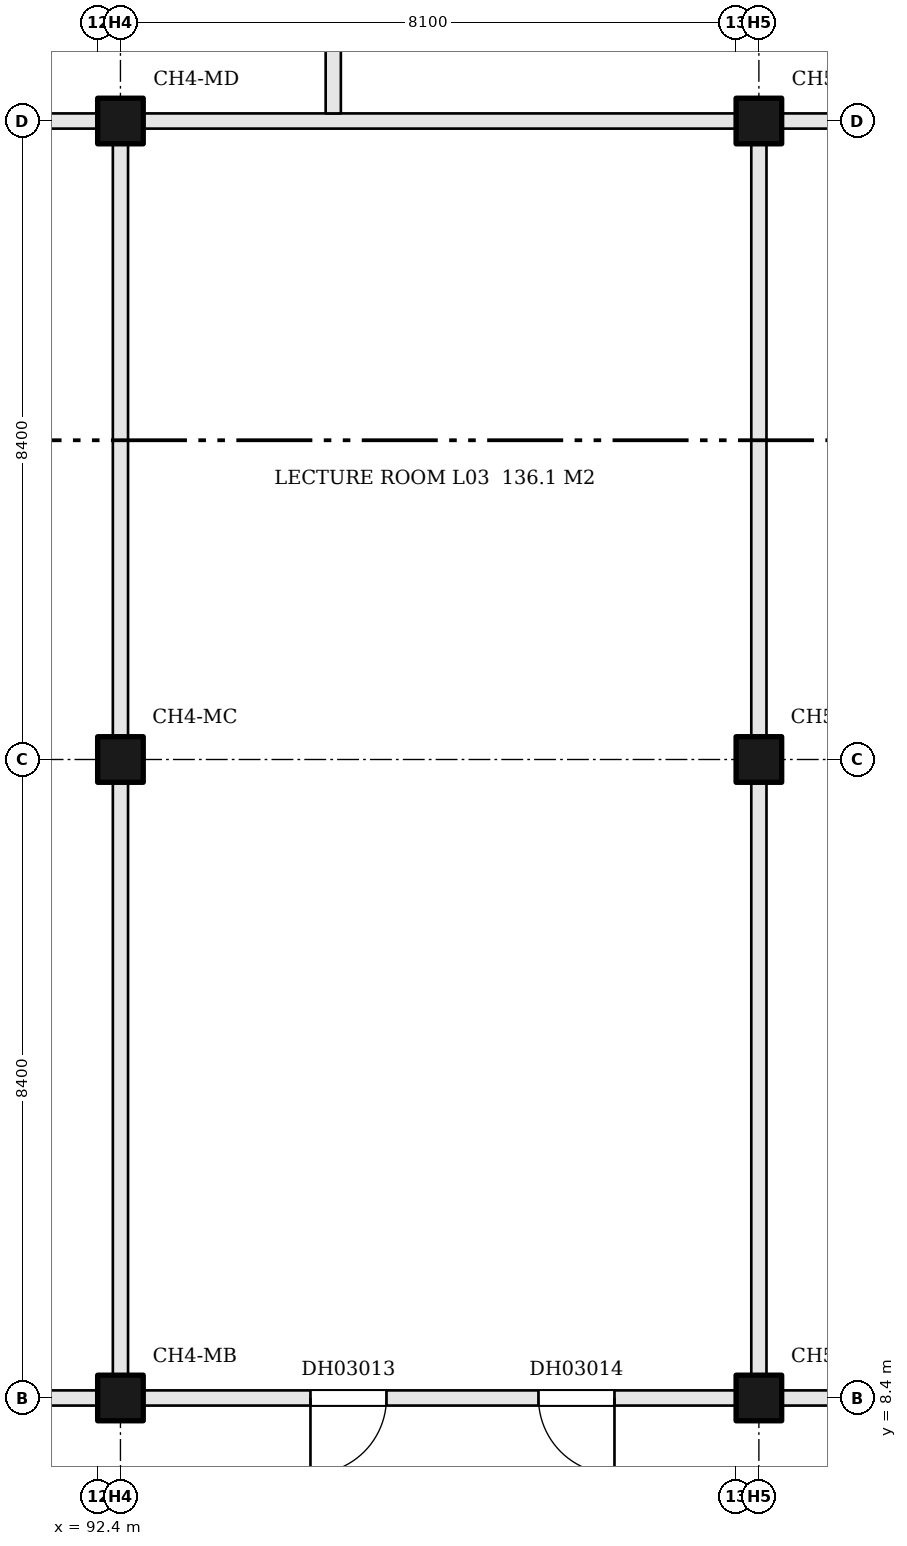
"""IFC4 building model, lengths in metres.
Left out: names, types, materials, properties, quantities, classifications, styles, units other than length and angle.
Written with IfcOpenShell. Run it as: python <this file> out.ifc"""

import sys

from ifc_helpers import new_model, si_unit, direction, frame, frame_2d, origin, origin_2d, place, context, subcontext, project, spatial, rectangle, extrude, element, fill, save


model = new_model("IFC4")
c1 = context("Model", 3, precision=1e-05, world=origin(), true_north=direction((0.0, 1.0)))
c2 = subcontext(c1, "Body", "Model", "MODEL_VIEW")
j1 = project(units=[si_unit("LENGTHUNIT", "METRE"), si_unit("PLANEANGLEUNIT", "RADIAN")], contexts=[c1])
p1 = place(None, origin())
s1 = spatial("IfcSite", under=j1, at=p1, CompositionType="ELEMENT")
p2 = place(p1, origin())
s2 = spatial("IfcBuilding", under=s1, at=p2, CompositionType="ELEMENT")
p3 = place(p2, frame((0.0, 0.0, 19.8)))
s3 = spatial("IfcBuildingStorey", under=s2, at=p3, CompositionType="ELEMENT", Elevation=19.8)
for number, where, z_axis, x_axis in (
    (1, (92.7, 8.4, 0.0), (0.0, 0.0, 1.0), (1.0, 0.0, 0.0)),
    (2, (92.7, 16.8, 0.0), (0.0, 0.0, 1.0), (1.0, 0.0, 0.0)),
    (3, (92.7, 25.2, 0.0), (0.0, 0.0, 1.0), (1.0, 0.0, 0.0)),
    (4, (101.1, 8.4, 0.0), (0.0, 0.0, 1.0), (1.0, 0.0, 0.0)),
    (5, (101.1, 16.8, 0.0), (0.0, 0.0, 1.0), (1.0, 0.0, 0.0)),
    (6, (101.1, 25.2, 0.0), (0.0, 0.0, 1.0), (1.0, 0.0, 0.0)),
):
    element("IfcColumn", number, at=place(p3, frame(where, z_axis=z_axis, x_axis=x_axis)), inside=s3, PredefinedType="COLUMN", context=c2, shape_type="SweptSolid", body=[
        extrude(rectangle(XDim=0.6, YDim=0.6, at=origin_2d()), origin(), (0.0, 0.0, 1.0), 5.0),
    ])
p4 = place(p3, frame((84.6, 8.4, 0.0), z_axis=(0.0, 0.0, 1.0), x_axis=(1.0, 0.0, 0.0)))
e7 = element("IfcWall", 7, at=p4, inside=s3, PredefinedType="PARTITIONING", context=c2, shape_type="SweptSolid", body=[
    extrude(rectangle(XDim=7.8, YDim=0.2, at=frame_2d((3.9, 0.0))), origin(), (0.0, 0.0, 1.0), 5.0),
])
p5 = place(p4, frame((2.2, 0.0, 0.0)))
e8 = element("IfcOpeningElement", 8, at=p5, cuts=e7, PredefinedType="OPENING", context=c2, shape_type="SweptSolid", body=[
    extrude(rectangle(XDim=1.0, YDim=2.1, at=frame_2d((0.5, 1.05))), frame((0.0, 0.11, 0.0), z_axis=(0.0, -1.0, 0.0), x_axis=(1.0, 0.0, 0.0)), (0.0, 0.0, 1.0), 0.22),
])
p6 = place(p4, frame((5.2, 0.0, 0.0)))
e9 = element("IfcOpeningElement", 9, at=p6, cuts=e7, PredefinedType="OPENING", context=c2, shape_type="SweptSolid", body=[
    extrude(rectangle(XDim=1.0, YDim=2.1, at=frame_2d((0.5, 1.05))), frame((0.0, 0.11, 0.0), z_axis=(0.0, -1.0, 0.0), x_axis=(1.0, 0.0, 0.0)), (0.0, 0.0, 1.0), 0.22),
])
p7 = place(p3, frame((93.0, 8.4, 0.0), z_axis=(0.0, 0.0, 1.0), x_axis=(1.0, 0.0, 0.0)))
e10 = element("IfcWall", 10, at=p7, inside=s3, PredefinedType="PARTITIONING", context=c2, shape_type="SweptSolid", body=[
    extrude(rectangle(XDim=7.8, YDim=0.2, at=frame_2d((3.9, 0.0))), origin(), (0.0, 0.0, 1.0), 5.0),
])
p8 = place(p7, frame((2.2, 0.0, 0.0)))
e11 = element("IfcOpeningElement", 11, at=p8, cuts=e10, PredefinedType="OPENING", context=c2, shape_type="SweptSolid", body=[
    extrude(rectangle(XDim=1.0, YDim=2.1, at=frame_2d((0.5, 1.05))), frame((0.0, 0.11, 0.0), z_axis=(0.0, -1.0, 0.0), x_axis=(1.0, 0.0, 0.0)), (0.0, 0.0, 1.0), 0.22),
])
p9 = place(p7, frame((5.2, 0.0, 0.0)))
e12 = element("IfcOpeningElement", 12, at=p9, cuts=e10, PredefinedType="OPENING", context=c2, shape_type="SweptSolid", body=[
    extrude(rectangle(XDim=1.0, YDim=2.1, at=frame_2d((0.5, 1.05))), frame((0.0, 0.11, 0.0), z_axis=(0.0, -1.0, 0.0), x_axis=(1.0, 0.0, 0.0)), (0.0, 0.0, 1.0), 0.22),
])
p10 = place(p3, frame((101.4, 8.4, 0.0), z_axis=(0.0, 0.0, 1.0), x_axis=(1.0, 0.0, 0.0)))
e13 = element("IfcWall", 13, at=p10, inside=s3, PredefinedType="PARTITIONING", context=c2, shape_type="SweptSolid", body=[
    extrude(rectangle(XDim=7.8, YDim=0.2, at=frame_2d((3.9, 0.0))), origin(), (0.0, 0.0, 1.0), 5.0),
])
p11 = place(p10, frame((2.2, 0.0, 0.0)))
e14 = element("IfcOpeningElement", 14, at=p11, cuts=e13, PredefinedType="OPENING", context=c2, shape_type="SweptSolid", body=[
    extrude(rectangle(XDim=1.0, YDim=2.1, at=frame_2d((0.5, 1.05))), frame((0.0, 0.11, 0.0), z_axis=(0.0, -1.0, 0.0), x_axis=(1.0, 0.0, 0.0)), (0.0, 0.0, 1.0), 0.22),
])
p12 = place(p10, frame((5.2, 0.0, 0.0)))
e15 = element("IfcOpeningElement", 15, at=p12, cuts=e13, PredefinedType="OPENING", context=c2, shape_type="SweptSolid", body=[
    extrude(rectangle(XDim=1.0, YDim=2.1, at=frame_2d((0.5, 1.05))), frame((0.0, 0.11, 0.0), z_axis=(0.0, -1.0, 0.0), x_axis=(1.0, 0.0, 0.0)), (0.0, 0.0, 1.0), 0.22),
])
p13 = place(p3, frame((84.6, 25.2, 0.0), z_axis=(0.0, 0.0, 1.0), x_axis=(1.0, 0.0, 0.0)))
e16 = element("IfcWall", 16, at=p13, inside=s3, PredefinedType="PARTITIONING", context=c2, shape_type="SweptSolid", body=[
    extrude(rectangle(XDim=7.8, YDim=0.2, at=frame_2d((3.9, 0.0))), origin(), (0.0, 0.0, 1.0), 5.0),
])
for number, where, z_axis, x_axis in (
    (17, (93.0, 25.2, 0.0), (0.0, 0.0, 1.0), (1.0, 0.0, 0.0)),
    (18, (101.4, 25.2, 0.0), (0.0, 0.0, 1.0), (1.0, 0.0, 0.0)),
    (19, (92.7, 8.7, 0.0), (0.0, 0.0, 1.0), (0.0, 1.0, 0.0)),
):
    element("IfcWall", number, at=place(p3, frame(where, z_axis=z_axis, x_axis=x_axis)), inside=s3, PredefinedType="PARTITIONING", context=c2, shape_type="SweptSolid", body=[
        extrude(rectangle(XDim=7.8, YDim=0.2, at=frame_2d((3.9, 0.0))), origin(), (0.0, 0.0, 1.0), 5.0),
    ])
p14 = place(p3, frame((92.7, 17.1, 0.0), z_axis=(0.0, 0.0, 1.0), x_axis=(0.0, 1.0, 0.0)))
e20 = element("IfcWall", 20, at=p14, inside=s3, PredefinedType="PARTITIONING", context=c2, shape_type="SweptSolid", body=[
    extrude(rectangle(XDim=7.8, YDim=0.2, at=frame_2d((3.9, 0.0))), origin(), (0.0, 0.0, 1.0), 5.0),
])
p15 = place(p3, frame((95.5, 25.3, 0.0), z_axis=(0.0, 0.0, 1.0), x_axis=(0.0, 1.0, 0.0)))
e21 = element("IfcWall", 21, at=p15, inside=s3, PredefinedType="PARTITIONING", context=c2, shape_type="SweptSolid", body=[
    extrude(rectangle(XDim=4.4, YDim=0.2, at=frame_2d((2.2, 0.0))), origin(), (0.0, 0.0, 1.0), 5.0),
])
p16 = place(p3, frame((101.1, 8.7, 0.0), z_axis=(0.0, 0.0, 1.0), x_axis=(0.0, 1.0, 0.0)))
e22 = element("IfcWall", 22, at=p16, inside=s3, PredefinedType="PARTITIONING", context=c2, shape_type="SweptSolid", body=[
    extrude(rectangle(XDim=7.8, YDim=0.2, at=frame_2d((3.9, 0.0))), origin(), (0.0, 0.0, 1.0), 5.0),
])
p17 = place(p3, frame((101.1, 17.1, 0.0), z_axis=(0.0, 0.0, 1.0), x_axis=(0.0, 1.0, 0.0)))
e23 = element("IfcWall", 23, at=p17, inside=s3, PredefinedType="PARTITIONING", context=c2, shape_type="SweptSolid", body=[
    extrude(rectangle(XDim=7.8, YDim=0.2, at=frame_2d((3.9, 0.0))), origin(), (0.0, 0.0, 1.0), 5.0),
])
p18 = place(p8, frame((1.0, 0.0, 0.0), z_axis=(0.0, 0.0, 1.0), x_axis=(-1.0, 0.0, 0.0)))
e24 = element("IfcDoor", 24, at=p18, inside=s3, OperationType="SINGLE_SWING_RIGHT", PredefinedType="DOOR", context=c2, shape_type="SweptSolid", body=[
    extrude(rectangle(XDim=1.0, YDim=2.1, at=frame_2d((0.5, 1.05))), frame((0.0, 0.025, 0.0), z_axis=(0.0, -1.0, 0.0), x_axis=(1.0, 0.0, 0.0)), (0.0, 0.0, 1.0), 0.05),
])
fill(e11, e24)
p19 = place(p9, frame((1.0, 0.0, 0.0), z_axis=(0.0, 0.0, 1.0), x_axis=(-1.0, 0.0, 0.0)))
e25 = element("IfcDoor", 25, at=p19, inside=s3, OperationType="SINGLE_SWING_LEFT", PredefinedType="DOOR", context=c2, shape_type="SweptSolid", body=[
    extrude(rectangle(XDim=1.0, YDim=2.1, at=frame_2d((0.5, 1.05))), frame((0.0, 0.025, 0.0), z_axis=(0.0, -1.0, 0.0), x_axis=(1.0, 0.0, 0.0)), (0.0, 0.0, 1.0), 0.05),
])
fill(e12, e25)
save(model, sys.argv[1])
